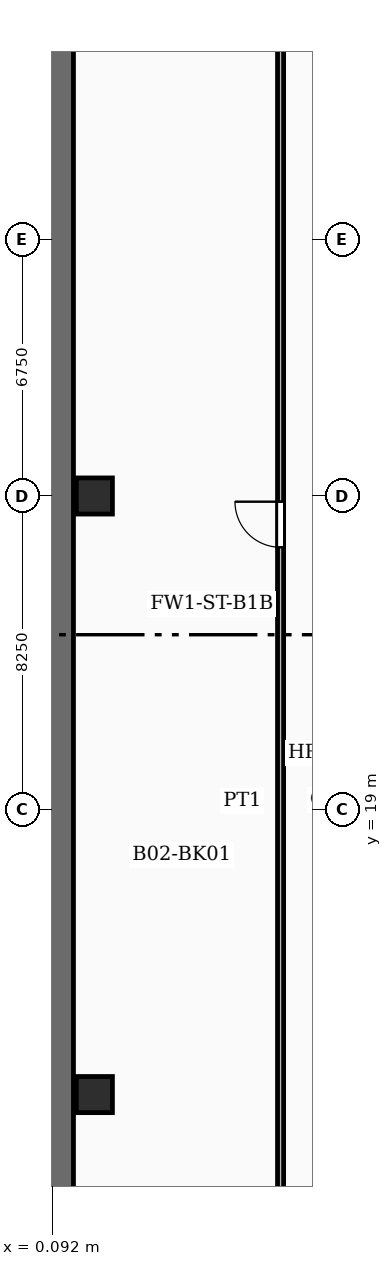
"""IFC4 building model, lengths in metres.
Left out: names, types, materials, properties, quantities, classifications, styles, units other than length and angle.
Written with IfcOpenShell. Run it as: python <this file> out.ifc"""

import sys

from ifc_helpers import new_model, si_unit, direction, frame, frame_2d, origin, origin_2d, place, context, subcontext, project, spatial, rectangle, extrude, element, fill, save


model = new_model("IFC4")
c1 = context("Model", 3, precision=1e-05, world=origin(), true_north=direction((0.0, 1.0)))
c2 = subcontext(c1, "Body", "Model", "MODEL_VIEW")
j1 = project(units=[si_unit("LENGTHUNIT", "METRE"), si_unit("PLANEANGLEUNIT", "RADIAN")], contexts=[c1])
p1 = place(None, origin())
s1 = spatial("IfcSite", under=j1, at=p1, CompositionType="ELEMENT")
p2 = place(p1, origin())
s2 = spatial("IfcBuilding", under=s1, at=p2, CompositionType="ELEMENT")
p3 = place(p2, frame((0.0, 0.0, -10.0)))
s3 = spatial("IfcBuildingStorey", under=s2, at=p3, CompositionType="ELEMENT", Elevation=-10.0)
p4 = place(p3, frame((0.325, 5.485, -0.85), z_axis=(0.0, 0.0, 1.0), x_axis=(0.0, 1.0, 0.0)))
e1 = element("IfcWall", 1, at=p4, inside=s3, PredefinedType="USERDEFINED", context=c2, shape_type="SweptSolid", body=[
    extrude(rectangle(XDim=43.53, YDim=0.65, at=frame_2d((21.765, 0.0))), origin(), (0.0, 0.0, 1.0), 5.54),
])
for number, where, z_axis, x_axis in (
    (2, (1.2, 27.25, -0.85), (0.0, 0.0, 1.0), (1.0, 0.0, 0.0)),
    (3, (1.2, 11.5, -0.85), (0.0, 0.0, 1.0), (1.0, 0.0, 0.0)),
):
    element("IfcColumn", number, at=place(p3, frame(where, z_axis=z_axis, x_axis=x_axis)), inside=s3, PredefinedType="COLUMN", context=c2, shape_type="SweptSolid", body=[
        extrude(rectangle(XDim=0.95, YDim=0.95, at=origin_2d()), origin(), (0.0, 0.0, 1.0), 5.54),
    ])
p5 = place(p3, frame((6.1, 0.5, 0.0), z_axis=(0.0, 0.0, 1.0), x_axis=(0.0, 1.0, 0.0)))
e4 = element("IfcWall", 4, at=p5, inside=s3, PredefinedType="PARTITIONING", context=c2, shape_type="SweptSolid", body=[
    extrude(rectangle(XDim=53.5, YDim=0.16, at=frame_2d((26.75, 0.0))), origin(), (0.0, 0.0, 1.0), 3.75),
])
p6 = place(p5, frame((25.4, 0.0, 0.0)))
e5 = element("IfcOpeningElement", 5, at=p6, cuts=e4, PredefinedType="OPENING", context=c2, shape_type="SweptSolid", body=[
    extrude(rectangle(XDim=1.2, YDim=2.2, at=frame_2d((0.6, 1.1))), frame((0.0, 0.09, 0.0), z_axis=(0.0, -1.0, 0.0), x_axis=(1.0, 0.0, 0.0)), (0.0, 0.0, 1.0), 0.18),
])
p7 = place(p6, origin())
e6 = element("IfcDoor", 6, at=p7, inside=s3, OperationType="SINGLE_SWING_RIGHT", PredefinedType="DOOR", context=c2, shape_type="SweptSolid", body=[
    extrude(rectangle(XDim=1.2, YDim=2.2, at=frame_2d((0.6, 1.1))), frame((0.0, 0.025, 0.0), z_axis=(0.0, -1.0, 0.0), x_axis=(1.0, 0.0, 0.0)), (0.0, 0.0, 1.0), 0.05),
])
fill(e5, e6)
save(model, sys.argv[1])
